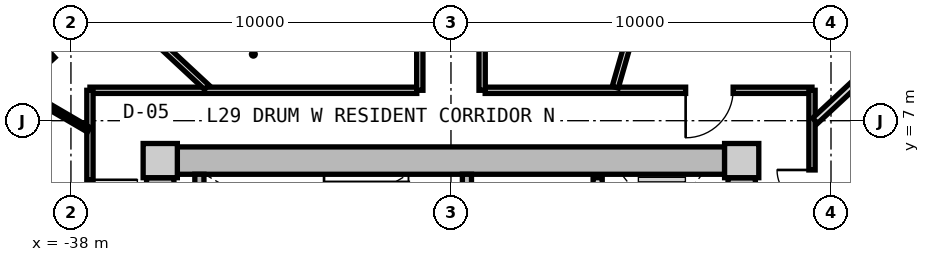
"""IFC4 building model, lengths in metres.
Left out: names, types, materials, properties, quantities, classifications, styles, units other than length and angle.
Written with IfcOpenShell. Run it as: python <this file> out.ifc"""

import sys

from ifc_helpers import new_model, si_unit, direction, frame, frame_2d, origin, origin_2d, place, context, subcontext, project, spatial, rectangle, extrude, source, transform, mapped, element, fill, save


model = new_model("IFC4")
c1 = context("Model", 3, precision=1e-05, world=origin(), true_north=direction((0.0, 1.0)))
c2 = subcontext(c1, "Body", "Model", "MODEL_VIEW")
j1 = project(units=[si_unit("LENGTHUNIT", "METRE"), si_unit("PLANEANGLEUNIT", "RADIAN")], contexts=[c1])
p1 = place(None, origin())
s1 = spatial("IfcSite", under=j1, at=p1, CompositionType="ELEMENT")
p2 = place(p1, origin())
s2 = spatial("IfcBuilding", under=s1, at=p2, CompositionType="ELEMENT")
p3 = place(p2, frame((0.0, 0.0, 96.25)))
s3 = spatial("IfcBuildingStorey", under=s2, at=p3, CompositionType="ELEMENT", Elevation=96.25)
m1 = source(origin(), c2, "Body", "SweptSolid", [
    extrude(rectangle(XDim=0.9, YDim=0.9, at=origin_2d()), origin(), (0.0, 0.0, 1.0), 3.05),
])
for number, where, z_axis, x_axis in (
    (1, (-20.35, 5.95, 0.0), (0.0, 0.0, 1.0), (1.0, 0.0, 0.0)),
    (2, (-35.65, 5.95, 0.0), (0.0, 0.0, 1.0), (1.0, 0.0, 0.0)),
):
    element("IfcColumn", number, at=place(p3, frame(where, z_axis=z_axis, x_axis=x_axis)), inside=s3, PredefinedType="COLUMN", context=c2, shape_type="MappedRepresentation", body=[
        mapped(m1, transform((0.0, 0.0, 0.0), x_axis=(1.0, 0.0, 0.0), y_axis=(0.0, 1.0, 0.0), z_axis=(0.0, 0.0, 1.0), scale=1.0)),
    ])
m2 = source(origin(), c2, "Body", "SweptSolid", [
    extrude(rectangle(XDim=14.4, YDim=0.72, at=frame_2d((7.2, 0.0))), origin(), (0.0, 0.0, 1.0), 2.79),
])
p4 = place(p3, frame((-35.2, 5.95, 0.0), z_axis=(0.0, 0.0, 1.0), x_axis=(1.0, 0.0, 0.0)))
e3 = element("IfcWall", 3, at=p4, inside=s3, PredefinedType="SHEAR", context=c2, shape_type="MappedRepresentation", body=[
    mapped(m2, transform((0.0, 0.0, 0.0), x_axis=(1.0, 0.0, 0.0), y_axis=(0.0, 1.0, 0.0), z_axis=(0.0, 0.0, 1.0), scale=1.0)),
])
m3 = source(origin(), c2, "Body", "SweptSolid", [
    extrude(rectangle(XDim=11.0, YDim=0.72, at=frame_2d((5.5, 0.0))), origin(), (0.0, 0.0, 1.0), 2.79),
])
p5 = place(p3, frame((-35.65, -5.5, 0.0), z_axis=(0.0, 0.0, 1.0), x_axis=(0.0, 1.0, 0.0)))
e4 = element("IfcWall", 4, at=p5, inside=s3, PredefinedType="SHEAR", context=c2, shape_type="MappedRepresentation", body=[
    mapped(m3, transform((0.0, 0.0, 0.0), x_axis=(1.0, 0.0, 0.0), y_axis=(0.0, 1.0, 0.0), z_axis=(0.0, 0.0, 1.0), scale=1.0)),
])
p6 = place(p5, frame((3.8, 0.0, 0.0)))
e5 = element("IfcOpeningElement", 5, at=p6, cuts=e4, PredefinedType="OPENING", context=c2, shape_type="SweptSolid", body=[
    extrude(rectangle(XDim=1.2, YDim=2.15, at=frame_2d((0.6, 1.075))), frame((0.0, 0.37, 0.0), z_axis=(0.0, -1.0, 0.0), x_axis=(1.0, 0.0, 0.0)), (0.0, 0.0, 1.0), 0.74),
])
p7 = place(p3, frame((-20.35, 5.5, 0.0), z_axis=(0.0, 0.0, 1.0), x_axis=(0.0, -1.0, 0.0)))
e6 = element("IfcWall", 6, at=p7, inside=s3, PredefinedType="SHEAR", context=c2, shape_type="MappedRepresentation", body=[
    mapped(m3, transform((0.0, 0.0, 0.0), x_axis=(1.0, 0.0, 0.0), y_axis=(0.0, 1.0, 0.0), z_axis=(0.0, 0.0, 1.0), scale=1.0)),
])
p8 = place(p7, frame((5.65, 0.0, 0.0)))
e7 = element("IfcOpeningElement", 7, at=p8, cuts=e6, PredefinedType="OPENING", context=c2, shape_type="SweptSolid", body=[
    extrude(rectangle(XDim=1.2, YDim=2.15, at=frame_2d((0.6, 1.075))), frame((0.0, 0.37, 0.0), z_axis=(0.0, -1.0, 0.0), x_axis=(1.0, 0.0, 0.0)), (0.0, 0.0, 1.0), 0.74),
])
p9 = place(p7, frame((9.3, 0.0, 0.0)))
e8 = element("IfcOpeningElement", 8, at=p9, cuts=e6, PredefinedType="OPENING", context=c2, shape_type="SweptSolid", body=[
    extrude(rectangle(XDim=1.0, YDim=2.1, at=frame_2d((0.5, 1.05))), frame((0.0, 0.37, 0.0), z_axis=(0.0, -1.0, 0.0), x_axis=(1.0, 0.0, 0.0)), (0.0, 0.0, 1.0), 0.74),
])
m4 = source(origin(), c2, "Body", "SweptSolid", [
    extrude(rectangle(XDim=3.14, YDim=0.24, at=frame_2d((1.57, 0.0))), origin(), (0.0, 0.0, 1.0), 2.79),
])
p10 = place(p3, frame((-34.62, 2.45, 0.0), z_axis=(0.0, 0.0, 1.0), x_axis=(0.0, 1.0, 0.0)))
e9 = element("IfcWall", 9, at=p10, inside=s3, PredefinedType="PARTITIONING", context=c2, shape_type="MappedRepresentation", body=[
    mapped(m4, transform((0.0, 0.0, 0.0), x_axis=(1.0, 0.0, 0.0), y_axis=(0.0, 1.0, 0.0), z_axis=(0.0, 0.0, 1.0), scale=1.0)),
])
p11 = place(p3, frame((-27.58, 2.45, 0.0), z_axis=(0.0, 0.0, 1.0), x_axis=(0.0, 1.0, 0.0)))
e10 = element("IfcWall", 10, at=p11, inside=s3, PredefinedType="PARTITIONING", context=c2, shape_type="MappedRepresentation", body=[
    mapped(m4, transform((0.0, 0.0, 0.0), x_axis=(1.0, 0.0, 0.0), y_axis=(0.0, 1.0, 0.0), z_axis=(0.0, 0.0, 1.0), scale=1.0)),
])
p12 = place(p11, frame((0.55, 0.0, 0.0)))
e11 = element("IfcOpeningElement", 11, at=p12, cuts=e10, PredefinedType="OPENING", context=c2, shape_type="SweptSolid", body=[
    extrude(rectangle(XDim=1.1, YDim=2.15, at=frame_2d((0.55, 1.075))), frame((0.0, 0.13, 0.0), z_axis=(0.0, -1.0, 0.0), x_axis=(1.0, 0.0, 0.0)), (0.0, 0.0, 1.0), 0.26),
])
m5 = source(origin(), c2, "Body", "SweptSolid", [
    extrude(rectangle(XDim=5.0, YDim=0.24, at=frame_2d((2.5, 0.0))), origin(), (0.0, 0.0, 1.0), 2.775),
])
p13 = place(p3, frame((-24.14, 0.5, 0.0), z_axis=(0.0, 0.0, 1.0), x_axis=(0.0, 1.0, 0.0)))
e12 = element("IfcWall", 12, at=p13, inside=s3, PredefinedType="PARTITIONING", context=c2, shape_type="MappedRepresentation", body=[
    mapped(m5, transform((0.0, 0.0, 0.0), x_axis=(1.0, 0.0, 0.0), y_axis=(0.0, 1.0, 0.0), z_axis=(0.0, 0.0, 1.0), scale=1.0)),
])
p14 = place(p13, frame((3.05, 0.0, 0.0)))
e13 = element("IfcOpeningElement", 13, at=p14, cuts=e12, PredefinedType="OPENING", context=c2, shape_type="SweptSolid", body=[
    extrude(rectangle(XDim=1.3, YDim=2.2, at=frame_2d((0.65, 1.1))), frame((0.0, 0.13, 0.0), z_axis=(0.0, -1.0, 0.0), x_axis=(1.0, 0.0, 0.0)), (0.0, 0.0, 1.0), 0.26),
])
p15 = place(p13, frame((0.55, 0.0, 0.0)))
e14 = element("IfcOpeningElement", 14, at=p15, cuts=e12, PredefinedType="OPENING", context=c2, shape_type="SweptSolid", body=[
    extrude(rectangle(XDim=1.3, YDim=2.2, at=frame_2d((0.65, 1.1))), frame((0.0, 0.13, 0.0), z_axis=(0.0, -1.0, 0.0), x_axis=(1.0, 0.0, 0.0)), (0.0, 0.0, 1.0), 0.26),
])
m6 = source(origin(), c2, "Body", "SweptSolid", [
    extrude(rectangle(XDim=8.6, YDim=0.165, at=frame_2d((4.3, 0.0))), origin(), (0.0, 0.0, 1.0), 2.775),
])
p16 = place(p3, frame((-37.5, 7.8, 0.0), z_axis=(0.0, 0.0, 1.0), x_axis=(1.0, 0.0, 0.0)))
e15 = element("IfcWall", 15, at=p16, inside=s3, PredefinedType="PARTITIONING", context=c2, shape_type="MappedRepresentation", body=[
    mapped(m6, transform((0.0, 0.0, 0.0), x_axis=(1.0, 0.0, 0.0), y_axis=(0.0, 1.0, 0.0), z_axis=(0.0, 0.0, 1.0), scale=1.0)),
])
p17 = place(p3, frame((-27.1, 7.8, 0.0), z_axis=(0.0, 0.0, 1.0), x_axis=(1.0, 0.0, 0.0)))
e16 = element("IfcWall", 16, at=p17, inside=s3, PredefinedType="PARTITIONING", context=c2, shape_type="MappedRepresentation", body=[
    mapped(m6, transform((0.0, 0.0, 0.0), x_axis=(1.0, 0.0, 0.0), y_axis=(0.0, 1.0, 0.0), z_axis=(0.0, 0.0, 1.0), scale=1.0)),
])
p18 = place(p17, frame((5.275, 0.0, 0.0)))
e17 = element("IfcOpeningElement", 17, at=p18, cuts=e16, PredefinedType="OPENING", context=c2, shape_type="SweptSolid", body=[
    extrude(rectangle(XDim=1.25, YDim=2.2, at=frame_2d((0.625, 1.1))), frame((0.0, 0.093, 0.0), z_axis=(0.0, -1.0, 0.0), x_axis=(1.0, 0.0, 0.0)), (0.0, 0.0, 1.0), 0.185),
])
m7 = source(origin(), c2, "Body", "SweptSolid", [
    extrude(rectangle(XDim=15.6, YDim=0.165, at=frame_2d((7.8, 0.0))), origin(), (0.0, 0.0, 1.0), 2.775),
])
p19 = place(p3, frame((-37.5, -7.8, 0.0), z_axis=(0.0, 0.0, 1.0), x_axis=(0.0, 1.0, 0.0)))
e18 = element("IfcWall", 18, at=p19, inside=s3, PredefinedType="PARTITIONING", context=c2, shape_type="MappedRepresentation", body=[
    mapped(m7, transform((0.0, 0.0, 0.0), x_axis=(1.0, 0.0, 0.0), y_axis=(0.0, 1.0, 0.0), z_axis=(0.0, 0.0, 1.0), scale=1.0)),
])
p20 = place(p19, frame((11.994, 0.0, 0.0)))
e19 = element("IfcOpeningElement", 19, at=p20, cuts=e18, PredefinedType="OPENING", context=c2, shape_type="SweptSolid", body=[
    extrude(rectangle(XDim=1.25, YDim=2.2, at=frame_2d((0.625, 1.1))), frame((0.0, 0.093, 0.0), z_axis=(0.0, -1.0, 0.0), x_axis=(1.0, 0.0, 0.0)), (0.0, 0.0, 1.0), 0.185),
])
p21 = place(p19, frame((4.867, 0.0, 0.0)))
e20 = element("IfcOpeningElement", 20, at=p21, cuts=e18, PredefinedType="OPENING", context=c2, shape_type="SweptSolid", body=[
    extrude(rectangle(XDim=1.25, YDim=2.2, at=frame_2d((0.625, 1.1))), frame((0.0, 0.093, 0.0), z_axis=(0.0, -1.0, 0.0), x_axis=(1.0, 0.0, 0.0)), (0.0, 0.0, 1.0), 0.185),
])
p22 = place(p3, frame((-18.5, 7.8, 0.0), z_axis=(0.0, 0.0, 1.0), x_axis=(0.0, -1.0, 0.0)))
e21 = element("IfcWall", 21, at=p22, inside=s3, PredefinedType="PARTITIONING", context=c2, shape_type="MappedRepresentation", body=[
    mapped(m7, transform((0.0, 0.0, 0.0), x_axis=(1.0, 0.0, 0.0), y_axis=(0.0, 1.0, 0.0), z_axis=(0.0, 0.0, 1.0), scale=1.0)),
])
p23 = place(p22, frame((9.734, 0.0, 0.0)))
e22 = element("IfcOpeningElement", 22, at=p23, cuts=e21, PredefinedType="OPENING", context=c2, shape_type="SweptSolid", body=[
    extrude(rectangle(XDim=1.25, YDim=2.2, at=frame_2d((0.625, 1.1))), frame((0.0, 0.093, 0.0), z_axis=(0.0, -1.0, 0.0), x_axis=(1.0, 0.0, 0.0)), (0.0, 0.0, 1.0), 0.185),
])
p24 = place(p22, frame((4.739, 0.0, 0.0)))
e23 = element("IfcOpeningElement", 23, at=p24, cuts=e21, PredefinedType="OPENING", context=c2, shape_type="SweptSolid", body=[
    extrude(rectangle(XDim=0.92, YDim=2.1, at=frame_2d((0.46, 1.05))), frame((0.0, 0.093, 0.0), z_axis=(0.0, -1.0, 0.0), x_axis=(1.0, 0.0, 0.0)), (0.0, 0.0, 1.0), 0.185),
])
p25 = place(p22, frame((2.096, 0.0, 0.0)))
e24 = element("IfcOpeningElement", 24, at=p25, cuts=e21, PredefinedType="OPENING", context=c2, shape_type="SweptSolid", body=[
    extrude(rectangle(XDim=0.92, YDim=2.1, at=frame_2d((0.46, 1.05))), frame((0.0, 0.093, 0.0), z_axis=(0.0, -1.0, 0.0), x_axis=(1.0, 0.0, 0.0)), (0.0, 0.0, 1.0), 0.185),
])
m8 = source(origin(), c2, "Body", "SweptSolid", [
    extrude(rectangle(XDim=8.989, YDim=0.165, at=frame_2d((4.495, 0.0))), origin(), (0.0, 0.0, 1.0), 2.275),
])
p26 = place(p3, frame((-23.678, 7.88, 0.0), z_axis=(0.0, 0.0, 1.0), x_axis=(0.27702323008, 0.960863221274, 0.0)))
e25 = element("IfcWall", 25, at=p26, inside=s3, PredefinedType="PARTITIONING", context=c2, shape_type="MappedRepresentation", body=[
    mapped(m8, transform((0.0, 0.0, 0.0), x_axis=(1.0, 0.0, 0.0), y_axis=(0.0, 1.0, 0.0), z_axis=(0.0, 0.0, 1.0), scale=1.0)),
])
m9 = source(origin(), c2, "Body", "SweptSolid", [
    extrude(rectangle(XDim=6.187, YDim=0.165, at=frame_2d((3.093, 0.0))), origin(), (0.0, 0.0, 1.0), 2.275),
])
p27 = place(p3, frame((-34.429, 7.88, 0.0), z_axis=(0.0, 0.0, 1.0), x_axis=(-0.732501077882, 0.680765870841, 0.0)))
e26 = element("IfcWall", 26, at=p27, inside=s3, PredefinedType="PARTITIONING", context=c2, shape_type="MappedRepresentation", body=[
    mapped(m9, transform((0.0, 0.0, 0.0), x_axis=(1.0, 0.0, 0.0), y_axis=(0.0, 1.0, 0.0), z_axis=(0.0, 0.0, 1.0), scale=1.0)),
])
m10 = source(origin(), c2, "Body", "SweptSolid", [
    extrude(rectangle(XDim=7.56, YDim=0.165, at=frame_2d((3.78, 0.0))), origin(), (0.0, 0.0, 1.0), 2.775),
])
p28 = place(p3, frame((-28.82, 7.8, 0.0), z_axis=(0.0, 0.0, 1.0), x_axis=(0.0, 1.0, 0.0)))
e27 = element("IfcWall", 27, at=p28, inside=s3, PredefinedType="PARTITIONING", context=c2, shape_type="MappedRepresentation", body=[
    mapped(m10, transform((0.0, 0.0, 0.0), x_axis=(1.0, 0.0, 0.0), y_axis=(0.0, 1.0, 0.0), z_axis=(0.0, 0.0, 1.0), scale=1.0)),
])
p29 = place(p28, frame((3.255, 0.0, 0.0)))
e28 = element("IfcOpeningElement", 28, at=p29, cuts=e27, PredefinedType="OPENING", context=c2, shape_type="SweptSolid", body=[
    extrude(rectangle(XDim=1.05, YDim=2.15, at=frame_2d((0.525, 1.075))), frame((0.0, 0.093, 0.0), z_axis=(0.0, -1.0, 0.0), x_axis=(1.0, 0.0, 0.0)), (0.0, 0.0, 1.0), 0.185),
])
p30 = place(p3, frame((-27.18, 7.8, 0.0), z_axis=(0.0, 0.0, 1.0), x_axis=(0.0, 1.0, 0.0)))
e29 = element("IfcWall", 29, at=p30, inside=s3, PredefinedType="PARTITIONING", context=c2, shape_type="MappedRepresentation", body=[
    mapped(m10, transform((0.0, 0.0, 0.0), x_axis=(1.0, 0.0, 0.0), y_axis=(0.0, 1.0, 0.0), z_axis=(0.0, 0.0, 1.0), scale=1.0)),
])
p31 = place(p30, frame((3.255, 0.0, 0.0)))
e30 = element("IfcOpeningElement", 30, at=p31, cuts=e29, PredefinedType="OPENING", context=c2, shape_type="SweptSolid", body=[
    extrude(rectangle(XDim=1.05, YDim=2.15, at=frame_2d((0.525, 1.075))), frame((0.0, 0.093, 0.0), z_axis=(0.0, -1.0, 0.0), x_axis=(1.0, 0.0, 0.0)), (0.0, 0.0, 1.0), 0.185),
])
m11 = source(origin(), c2, "Body", "SweptSolid", [
    extrude(rectangle(XDim=2.172, YDim=0.14, at=frame_2d((1.086, 0.0))), origin(), (0.0, 0.0, 1.0), 2.775),
])
p32 = place(p3, frame((-37.53, 6.762, 0.0), z_axis=(0.0, 0.0, 1.0), x_axis=(-0.863562702562, 0.504241468688, 0.0)))
e31 = element("IfcWall", 31, at=p32, inside=s3, PredefinedType="PARTITIONING", context=c2, shape_type="MappedRepresentation", body=[
    mapped(m11, transform((0.0, 0.0, 0.0), x_axis=(1.0, 0.0, 0.0), y_axis=(0.0, 1.0, 0.0), z_axis=(0.0, 0.0, 1.0), scale=1.0)),
])
m12 = source(origin(), c2, "Body", "SweptSolid", [
    extrude(rectangle(XDim=3.457, YDim=0.14, at=frame_2d((1.729, 0.0))), origin(), (0.0, 0.0, 1.0), 2.775),
])
p33 = place(p3, frame((-39.405, 7.857, 0.0), z_axis=(0.0, 0.0, 1.0), x_axis=(0.737567375492, 0.675273549467, 0.0)))
e32 = element("IfcWall", 32, at=p33, inside=s3, PredefinedType="PARTITIONING", context=c2, shape_type="MappedRepresentation", body=[
    mapped(m12, transform((0.0, 0.0, 0.0), x_axis=(1.0, 0.0, 0.0), y_axis=(0.0, 1.0, 0.0), z_axis=(0.0, 0.0, 1.0), scale=1.0)),
])
p34 = place(p33, frame((1.268, 0.0, 0.0)))
e33 = element("IfcOpeningElement", 33, at=p34, cuts=e32, PredefinedType="OPENING", context=c2, shape_type="SweptSolid", body=[
    extrude(rectangle(XDim=0.92, YDim=2.1, at=frame_2d((0.46, 1.05))), frame((0.0, 0.08, 0.0), z_axis=(0.0, -1.0, 0.0), x_axis=(1.0, 0.0, 0.0)), (0.0, 0.0, 1.0), 0.16),
])
m13 = source(origin(), c2, "Body", "SweptSolid", [
    extrude(rectangle(XDim=7.482, YDim=0.19, at=frame_2d((3.741, 0.0))), origin(), (0.0, 0.0, 1.0), 2.275),
])
p35 = place(p3, frame((-18.42, 6.998, 0.0), z_axis=(0.0, 0.0, 1.0), x_axis=(0.732508698043, 0.680757671489, 0.0)))
e34 = element("IfcWall", 34, at=p35, inside=s3, PredefinedType="PARTITIONING", context=c2, shape_type="MappedRepresentation", body=[
    mapped(m13, transform((0.0, 0.0, 0.0), x_axis=(1.0, 0.0, 0.0), y_axis=(0.0, 1.0, 0.0), z_axis=(0.0, 0.0, 1.0), scale=1.0)),
])
m14 = source(origin(), c2, "Body", "SweptSolid", [
    extrude(rectangle(XDim=9.447, YDim=0.14, at=frame_2d((4.724, 0.0))), origin(), (0.0, 0.0, 1.0), 2.775),
])
p36 = place(p3, frame((-18.47, 3.289, 0.0), z_axis=(0.0, 0.0, 1.0), x_axis=(0.918162367414, 0.396204324894, 0.0)))
e35 = element("IfcWall", 35, at=p36, inside=s3, PredefinedType="PARTITIONING", context=c2, shape_type="MappedRepresentation", body=[
    mapped(m14, transform((0.0, 0.0, 0.0), x_axis=(1.0, 0.0, 0.0), y_axis=(0.0, 1.0, 0.0), z_axis=(0.0, 0.0, 1.0), scale=1.0)),
])
m15 = source(origin(), c2, "Body", "SweptSolid", [
    extrude(rectangle(XDim=1.25, YDim=2.2, at=frame_2d((0.625, 1.1))), frame((0.0, 0.025, 0.0), z_axis=(0.0, -1.0, 0.0), x_axis=(1.0, 0.0, 0.0)), (0.0, 0.0, 1.0), 0.05),
])
p37 = place(p20, frame((1.25, 0.0, 0.0), z_axis=(0.0, 0.0, 1.0), x_axis=(-1.0, 0.0, 0.0)))
e36 = element("IfcDoor", 36, at=p37, inside=s3, OperationType="SINGLE_SWING_LEFT", PredefinedType="DOOR", context=c2, shape_type="MappedRepresentation", body=[
    mapped(m15, transform((0.0, 0.0, 0.0), x_axis=(1.0, 0.0, 0.0), y_axis=(0.0, 1.0, 0.0), z_axis=(0.0, 0.0, 1.0), scale=1.0)),
])
fill(e19, e36)
m16 = source(origin(), c2, "Body", "SweptSolid", [
    extrude(rectangle(XDim=0.92, YDim=2.1, at=frame_2d((0.46, 1.05))), frame((0.0, 0.025, 0.0), z_axis=(0.0, -1.0, 0.0), x_axis=(1.0, 0.0, 0.0)), (0.0, 0.0, 1.0), 0.05),
])
p38 = place(p34, origin())
e37 = element("IfcDoor", 37, at=p38, inside=s3, OperationType="SINGLE_SWING_RIGHT", PredefinedType="DOOR", context=c2, shape_type="MappedRepresentation", body=[
    mapped(m16, transform((0.0, 0.0, 0.0), x_axis=(1.0, 0.0, 0.0), y_axis=(0.0, 1.0, 0.0), z_axis=(0.0, 0.0, 1.0), scale=1.0)),
])
fill(e33, e37)
p39 = place(p25, frame((0.92, 0.0, 0.0), z_axis=(0.0, 0.0, 1.0), x_axis=(-1.0, 0.0, 0.0)))
e38 = element("IfcDoor", 38, at=p39, inside=s3, OperationType="SINGLE_SWING_RIGHT", PredefinedType="DOOR", context=c2, shape_type="MappedRepresentation", body=[
    mapped(m16, transform((0.0, 0.0, 0.0), x_axis=(1.0, 0.0, 0.0), y_axis=(0.0, 1.0, 0.0), z_axis=(0.0, 0.0, 1.0), scale=1.0)),
])
fill(e24, e38)
p40 = place(p18, frame((1.25, 0.0, 0.0), z_axis=(0.0, 0.0, 1.0), x_axis=(-1.0, 0.0, 0.0)))
e39 = element("IfcDoor", 39, at=p40, inside=s3, OperationType="SINGLE_SWING_RIGHT", PredefinedType="DOOR", context=c2, shape_type="MappedRepresentation", body=[
    mapped(m15, transform((0.0, 0.0, 0.0), x_axis=(1.0, 0.0, 0.0), y_axis=(0.0, 1.0, 0.0), z_axis=(0.0, 0.0, 1.0), scale=1.0)),
])
fill(e17, e39)
save(model, sys.argv[1])
